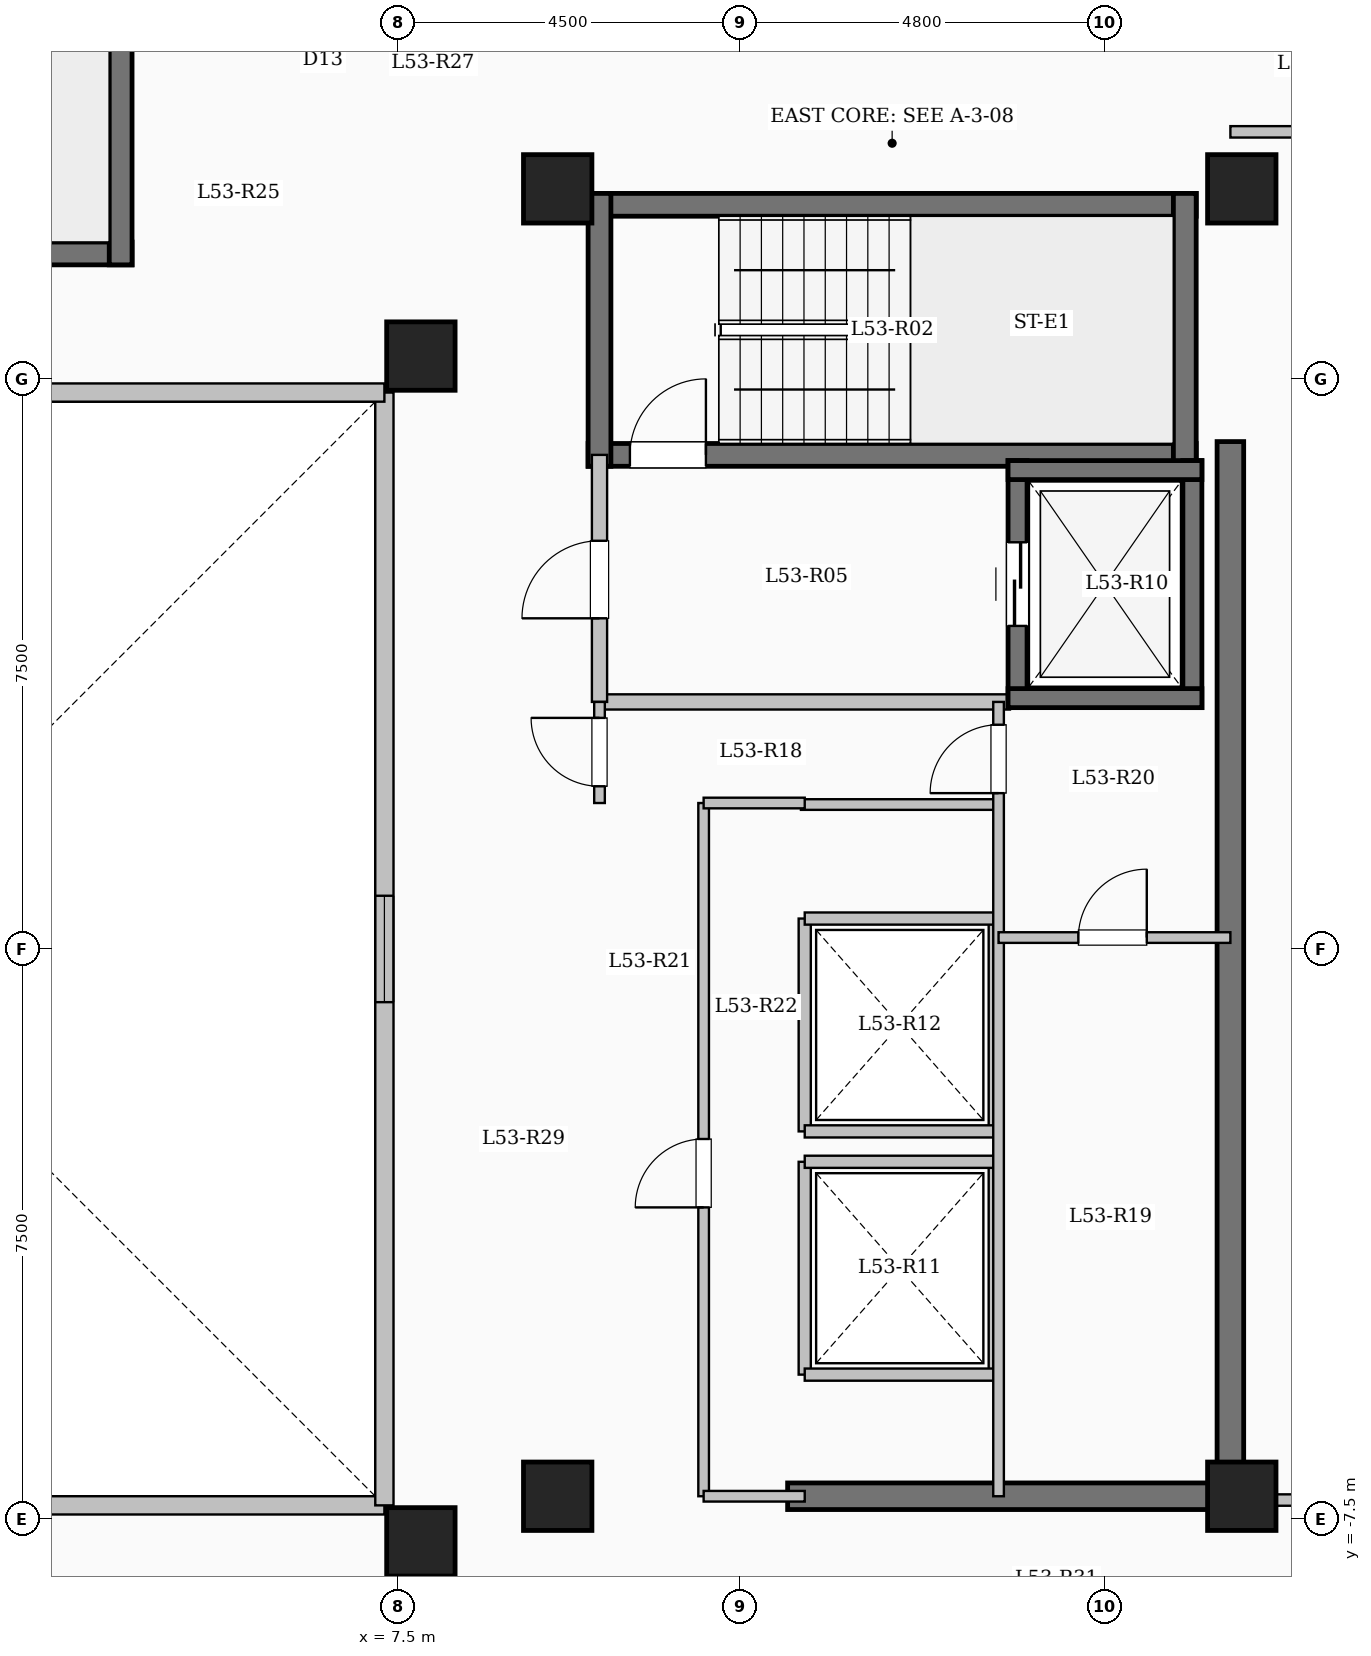
"""IFC4 building model, lengths in metres.
Left out: names, types, materials, properties, quantities, classifications, styles, units other than length and angle.
Written with IfcOpenShell. Run it as: python <this file> out.ifc"""

import sys

from ifc_helpers import new_model, si_unit, direction, frame, frame_2d, origin, origin_2d, place, context, subcontext, project, spatial, rectangle, extrude, element, fill, save


model = new_model("IFC4")
c1 = context("Model", 3, precision=1e-05, world=origin(), true_north=direction((0.0, 1.0)))
c2 = subcontext(c1, "Body", "Model", "MODEL_VIEW")
j1 = project(units=[si_unit("LENGTHUNIT", "METRE"), si_unit("PLANEANGLEUNIT", "RADIAN")], contexts=[c1])
p1 = place(None, origin())
s1 = spatial("IfcSite", under=j1, at=p1, CompositionType="ELEMENT")
p2 = place(p1, origin())
s2 = spatial("IfcBuilding", under=s1, at=p2, CompositionType="ELEMENT")
p3 = place(p2, frame((0.0, 0.0, 196.95)))
s3 = spatial("IfcBuildingStorey", under=s2, at=p3, CompositionType="ELEMENT", Elevation=196.95)
for number, where, z_axis, x_axis in (
    (1, (7.8, -7.8, 0.0), (0.0, 0.0, 1.0), (1.0, 0.0, 0.0)),
    (2, (7.8, 7.8, 0.0), (0.0, 0.0, 1.0), (1.0, 0.0, 0.0)),
    (3, (9.6, -7.2, 0.0), (0.0, 0.0, 1.0), (1.0, 0.0, 0.0)),
    (4, (9.6, 10.0, 0.0), (0.0, 0.0, 1.0), (1.0, 0.0, 0.0)),
    (5, (18.6, -7.2, 0.0), (0.0, 0.0, 1.0), (1.0, 0.0, 0.0)),
    (6, (18.6, 10.0, 0.0), (0.0, 0.0, 1.0), (1.0, 0.0, 0.0)),
):
    element("IfcColumn", number, at=place(p3, frame(where, z_axis=z_axis, x_axis=x_axis)), inside=s3, PredefinedType="COLUMN", context=c2, shape_type="SweptSolid", body=[
        extrude(rectangle(XDim=0.9, YDim=0.9, at=origin_2d()), origin(), (0.0, 0.0, 1.0), 3.35),
    ])
p4 = place(p3, frame((-7.32, -7.32, 0.0), z_axis=(0.0, 0.0, 1.0), x_axis=(1.0, 0.0, 0.0)))
e7 = element("IfcWall", 7, at=p4, inside=s3, PredefinedType="SOLIDWALL", context=c2, shape_type="SweptSolid", body=[
    extrude(rectangle(XDim=14.64, YDim=0.24, at=frame_2d((7.32, 0.0))), origin(), (0.0, 0.0, 1.0), 3.1),
])
p5 = place(p4, frame((6.62, 0.0, 0.95)))
e8 = element("IfcOpeningElement", 8, at=p5, cuts=e7, PredefinedType="OPENING", context=c2, shape_type="SweptSolid", body=[
    extrude(rectangle(XDim=1.4, YDim=1.5, at=frame_2d((0.7, 0.75))), frame((0.0, 0.13, 0.0), z_axis=(0.0, -1.0, 0.0), x_axis=(1.0, 0.0, 0.0)), (0.0, 0.0, 1.0), 0.26),
])
p6 = place(p3, frame((7.32, -7.32, 0.0), z_axis=(0.0, 0.0, 1.0), x_axis=(0.0, 1.0, 0.0)))
e9 = element("IfcWall", 9, at=p6, inside=s3, PredefinedType="SOLIDWALL", context=c2, shape_type="SweptSolid", body=[
    extrude(rectangle(XDim=14.64, YDim=0.24, at=frame_2d((7.32, 0.0))), origin(), (0.0, 0.0, 1.0), 3.1),
])
p7 = place(p6, frame((6.62, 0.0, 0.95)))
e10 = element("IfcOpeningElement", 10, at=p7, cuts=e9, PredefinedType="OPENING", context=c2, shape_type="SweptSolid", body=[
    extrude(rectangle(XDim=1.4, YDim=1.5, at=frame_2d((0.7, 0.75))), frame((0.0, 0.13, 0.0), z_axis=(0.0, -1.0, 0.0), x_axis=(1.0, 0.0, 0.0)), (0.0, 0.0, 1.0), 0.26),
])
p8 = place(p3, frame((7.32, 7.32, 0.0), z_axis=(0.0, 0.0, 1.0), x_axis=(-1.0, 0.0, 0.0)))
e11 = element("IfcWall", 11, at=p8, inside=s3, PredefinedType="SOLIDWALL", context=c2, shape_type="SweptSolid", body=[
    extrude(rectangle(XDim=14.64, YDim=0.24, at=frame_2d((7.32, 0.0))), origin(), (0.0, 0.0, 1.0), 3.1),
])
p9 = place(p8, frame((6.62, 0.0, 0.95)))
e12 = element("IfcOpeningElement", 12, at=p9, cuts=e11, PredefinedType="OPENING", context=c2, shape_type="SweptSolid", body=[
    extrude(rectangle(XDim=1.4, YDim=1.5, at=frame_2d((0.7, 0.75))), frame((0.0, 0.13, 0.0), z_axis=(0.0, -1.0, 0.0), x_axis=(1.0, 0.0, 0.0)), (0.0, 0.0, 1.0), 0.26),
])
p10 = place(p3, frame((10.0, 9.79, 0.0), z_axis=(0.0, 0.0, 1.0), x_axis=(1.0, 0.0, 0.0)))
e13 = element("IfcWall", 13, at=p10, inside=s3, PredefinedType="SHEAR", context=c2, shape_type="SweptSolid", body=[
    extrude(rectangle(XDim=8.0, YDim=0.3, at=frame_2d((4.0, 0.0))), origin(), (0.0, 0.0, 1.0), 3.35),
])
p11 = place(p3, frame((10.0, 6.5, 0.0), z_axis=(0.0, 0.0, 1.0), x_axis=(1.0, 0.0, 0.0)))
e14 = element("IfcWall", 14, at=p11, inside=s3, PredefinedType="SHEAR", context=c2, shape_type="SweptSolid", body=[
    extrude(rectangle(XDim=8.0, YDim=0.3, at=frame_2d((4.0, 0.0))), origin(), (0.0, 0.0, 1.0), 3.35),
])
p12 = place(p11, frame((0.55, 0.0, 0.0)))
e15 = element("IfcOpeningElement", 15, at=p12, cuts=e14, PredefinedType="OPENING", context=c2, shape_type="SweptSolid", body=[
    extrude(rectangle(XDim=1.0, YDim=2.15, at=frame_2d((0.5, 1.075))), frame((0.0, 0.16, 0.0), z_axis=(0.0, -1.0, 0.0), x_axis=(1.0, 0.0, 0.0)), (0.0, 0.0, 1.0), 0.32),
])
for number, where, z_axis, x_axis in (
    (16, (10.15, 6.35, 0.0), (0.0, 0.0, 1.0), (0.0, 1.0, 0.0)),
    (17, (17.85, 6.35, 0.0), (0.0, 0.0, 1.0), (0.0, 1.0, 0.0)),
):
    element("IfcWall", number, at=place(p3, frame(where, z_axis=z_axis, x_axis=x_axis)), inside=s3, PredefinedType="SHEAR", context=c2, shape_type="SweptSolid", body=[
        extrude(rectangle(XDim=3.59, YDim=0.3, at=frame_2d((1.795, 0.0))), origin(), (0.0, 0.0, 1.0), 3.35),
    ])
p13 = place(p3, frame((-4.0, 9.15, 0.0), z_axis=(0.0, 0.0, 1.0), x_axis=(1.0, 0.0, 0.0)))
e18 = element("IfcWall", 18, at=p13, inside=s3, PredefinedType="SHEAR", context=c2, shape_type="SweptSolid", body=[
    extrude(rectangle(XDim=8.0, YDim=0.3, at=frame_2d((4.0, 0.0))), origin(), (0.0, 0.0, 1.0), 3.35),
])
p14 = place(p13, frame((0.55, 0.0, 0.0)))
e19 = element("IfcOpeningElement", 19, at=p14, cuts=e18, PredefinedType="OPENING", context=c2, shape_type="SweptSolid", body=[
    extrude(rectangle(XDim=1.0, YDim=2.15, at=frame_2d((0.5, 1.075))), frame((0.0, 0.16, 0.0), z_axis=(0.0, -1.0, 0.0), x_axis=(1.0, 0.0, 0.0)), (0.0, 0.0, 1.0), 0.32),
])
p15 = place(p3, frame((3.85, 9.0, 0.0), z_axis=(0.0, 0.0, 1.0), x_axis=(0.0, 1.0, 0.0)))
e20 = element("IfcWall", 20, at=p15, inside=s3, PredefinedType="SHEAR", context=c2, shape_type="SweptSolid", body=[
    extrude(rectangle(XDim=3.59, YDim=0.3, at=frame_2d((1.795, 0.0))), origin(), (0.0, 0.0, 1.0), 3.35),
])
p16 = place(p3, frame((10.15, 3.25, 0.0), z_axis=(0.0, 0.0, 1.0), x_axis=(1.0, 0.0, 0.0)))
e21 = element("IfcWall", 21, at=p16, inside=s3, PredefinedType="SOLIDWALL", context=c2, shape_type="SweptSolid", body=[
    extrude(rectangle(XDim=5.4, YDim=0.2, at=frame_2d((2.7, 0.0))), origin(), (0.0, 0.0, 1.0), 3.1),
])
p17 = place(p3, frame((10.15, 3.25, 0.0), z_axis=(0.0, 0.0, 1.0), x_axis=(0.0, 1.0, 0.0)))
e22 = element("IfcWall", 22, at=p17, inside=s3, PredefinedType="SOLIDWALL", context=c2, shape_type="SweptSolid", body=[
    extrude(rectangle(XDim=3.25, YDim=0.2, at=frame_2d((1.625, 0.0))), origin(), (0.0, 0.0, 1.0), 3.1),
])
p18 = place(p17, frame((1.1, 0.0, 0.0)))
e23 = element("IfcOpeningElement", 23, at=p18, cuts=e22, PredefinedType="OPENING", context=c2, shape_type="SweptSolid", body=[
    extrude(rectangle(XDim=1.02, YDim=2.15, at=frame_2d((0.51, 1.075))), frame((0.0, 0.11, 0.0), z_axis=(0.0, -1.0, 0.0), x_axis=(1.0, 0.0, 0.0)), (0.0, 0.0, 1.0), 0.22),
])
p19 = place(p3, frame((15.65, 3.175, 0.0), z_axis=(0.0, 0.0, 1.0), x_axis=(0.0, 1.0, 0.0)))
e24 = element("IfcWall", 24, at=p19, inside=s3, PredefinedType="SHEAR", context=c2, shape_type="SweptSolid", body=[
    extrude(rectangle(XDim=3.25, YDim=0.25, at=frame_2d((1.625, 0.0))), origin(), (0.0, 0.0, 1.0), 3.35),
])
p20 = place(p19, frame((1.075, 0.0, 0.0)))
e25 = element("IfcOpeningElement", 25, at=p20, cuts=e24, PredefinedType="OPENING", context=c2, shape_type="SweptSolid", body=[
    extrude(rectangle(XDim=1.1, YDim=2.15, at=frame_2d((0.55, 1.075))), frame((0.0, 0.135, 0.0), z_axis=(0.0, -1.0, 0.0), x_axis=(1.0, 0.0, 0.0)), (0.0, 0.0, 1.0), 0.27),
])
p21 = place(p3, frame((17.95, 3.175, 0.0), z_axis=(0.0, 0.0, 1.0), x_axis=(0.0, 1.0, 0.0)))
e26 = element("IfcWall", 26, at=p21, inside=s3, PredefinedType="SHEAR", context=c2, shape_type="SweptSolid", body=[
    extrude(rectangle(XDim=3.25, YDim=0.25, at=frame_2d((1.625, 0.0))), origin(), (0.0, 0.0, 1.0), 3.35),
])
for number, where, z_axis, x_axis in (
    (27, (15.525, 3.3, 0.0), (0.0, 0.0, 1.0), (1.0, 0.0, 0.0)),
    (28, (15.525, 6.3, 0.0), (0.0, 0.0, 1.0), (1.0, 0.0, 0.0)),
):
    element("IfcWall", number, at=place(p3, frame(where, z_axis=z_axis, x_axis=x_axis)), inside=s3, PredefinedType="SHEAR", context=c2, shape_type="SweptSolid", body=[
        extrude(rectangle(XDim=2.55, YDim=0.25, at=frame_2d((1.275, 0.0))), origin(), (0.0, 0.0, 1.0), 3.35),
    ])
for number, where, z_axis, x_axis in (
    (29, (12.85, -5.6, 0.0), (0.0, 0.0, 1.0), (0.0, 1.0, 0.0)),
    (30, (15.35, -5.6, 0.0), (0.0, 0.0, 1.0), (0.0, 1.0, 0.0)),
):
    element("IfcWall", number, at=place(p3, frame(where, z_axis=z_axis, x_axis=x_axis)), inside=s3, PredefinedType="SOLIDWALL", context=c2, shape_type="SweptSolid", body=[
        extrude(rectangle(XDim=2.8, YDim=0.16, at=frame_2d((1.4, 0.0))), origin(), (0.0, 0.0, 1.0), 3.1),
    ])
for number, where, z_axis, x_axis in (
    (31, (12.85, -5.6, 0.0), (0.0, 0.0, 1.0), (1.0, 0.0, 0.0)),
    (32, (12.85, -2.8, 0.0), (0.0, 0.0, 1.0), (1.0, 0.0, 0.0)),
):
    element("IfcWall", number, at=place(p3, frame(where, z_axis=z_axis, x_axis=x_axis)), inside=s3, PredefinedType="SOLIDWALL", context=c2, shape_type="SweptSolid", body=[
        extrude(rectangle(XDim=2.5, YDim=0.16, at=frame_2d((1.25, 0.0))), origin(), (0.0, 0.0, 1.0), 3.1),
    ])
for number, where, z_axis, x_axis in (
    (33, (12.85, -2.4, 0.0), (0.0, 0.0, 1.0), (0.0, 1.0, 0.0)),
    (34, (15.35, -2.4, 0.0), (0.0, 0.0, 1.0), (0.0, 1.0, 0.0)),
):
    element("IfcWall", number, at=place(p3, frame(where, z_axis=z_axis, x_axis=x_axis)), inside=s3, PredefinedType="SOLIDWALL", context=c2, shape_type="SweptSolid", body=[
        extrude(rectangle(XDim=2.8, YDim=0.16, at=frame_2d((1.4, 0.0))), origin(), (0.0, 0.0, 1.0), 3.1),
    ])
for number, where, z_axis, x_axis in (
    (35, (12.85, -2.4, 0.0), (0.0, 0.0, 1.0), (1.0, 0.0, 0.0)),
    (36, (12.85, 0.4, 0.0), (0.0, 0.0, 1.0), (1.0, 0.0, 0.0)),
):
    element("IfcWall", number, at=place(p3, frame(where, z_axis=z_axis, x_axis=x_axis)), inside=s3, PredefinedType="SOLIDWALL", context=c2, shape_type="SweptSolid", body=[
        extrude(rectangle(XDim=2.5, YDim=0.16, at=frame_2d((1.25, 0.0))), origin(), (0.0, 0.0, 1.0), 3.1),
    ])
p22 = place(p3, frame((18.45, -7.375, 0.0), z_axis=(0.0, 0.0, 1.0), x_axis=(0.0, 1.0, 0.0)))
e37 = element("IfcWall", 37, at=p22, inside=s3, PredefinedType="SHEAR", context=c2, shape_type="SweptSolid", body=[
    extrude(rectangle(XDim=14.05, YDim=0.35, at=frame_2d((7.025, 0.0))), origin(), (0.0, 0.0, 1.0), 3.35),
])
p23 = place(p3, frame((12.625, -7.2, 0.0), z_axis=(0.0, 0.0, 1.0), x_axis=(1.0, 0.0, 0.0)))
e38 = element("IfcWall", 38, at=p23, inside=s3, PredefinedType="SHEAR", context=c2, shape_type="SweptSolid", body=[
    extrude(rectangle(XDim=6.0, YDim=0.35, at=frame_2d((3.0, 0.0))), origin(), (0.0, 0.0, 1.0), 3.35),
])
p24 = place(p3, frame((12.8, 1.9, 0.0), z_axis=(0.0, 0.0, 1.0), x_axis=(1.0, 0.0, 0.0)))
e39 = element("IfcWall", 39, at=p24, inside=s3, PredefinedType="PARTITIONING", context=c2, shape_type="SweptSolid", body=[
    extrude(rectangle(XDim=2.6, YDim=0.14, at=frame_2d((1.3, 0.0))), origin(), (0.0, 0.0, 1.0), 3.1),
])
p25 = place(p3, frame((10.15, 1.92, 0.0), z_axis=(0.0, 0.0, 1.0), x_axis=(0.0, 1.0, 0.0)))
e40 = element("IfcWall", 40, at=p25, inside=s3, PredefinedType="PARTITIONING", context=c2, shape_type="SweptSolid", body=[
    extrude(rectangle(XDim=1.33, YDim=0.14, at=frame_2d((0.665, 0.0))), origin(), (0.0, 0.0, 1.0), 3.1),
])
p26 = place(p25, frame((0.22, 0.0, 0.0)))
e41 = element("IfcOpeningElement", 41, at=p26, cuts=e40, PredefinedType="OPENING", context=c2, shape_type="SweptSolid", body=[
    extrude(rectangle(XDim=0.9, YDim=2.08, at=frame_2d((0.45, 1.04))), frame((0.0, 0.08, 0.0), z_axis=(0.0, -1.0, 0.0), x_axis=(1.0, 0.0, 0.0)), (0.0, 0.0, 1.0), 0.16),
])
p27 = place(p3, frame((15.4, -7.2, 0.0), z_axis=(0.0, 0.0, 1.0), x_axis=(0.0, 1.0, 0.0)))
e42 = element("IfcWall", 42, at=p27, inside=s3, PredefinedType="PARTITIONING", context=c2, shape_type="SweptSolid", body=[
    extrude(rectangle(XDim=10.45, YDim=0.14, at=frame_2d((5.225, 0.0))), origin(), (0.0, 0.0, 1.0), 3.1),
])
p28 = place(p27, frame((9.25, 0.0, 0.0)))
e43 = element("IfcOpeningElement", 43, at=p28, cuts=e42, PredefinedType="OPENING", context=c2, shape_type="SweptSolid", body=[
    extrude(rectangle(XDim=0.9, YDim=2.08, at=frame_2d((0.45, 1.04))), frame((0.0, 0.08, 0.0), z_axis=(0.0, -1.0, 0.0), x_axis=(1.0, 0.0, 0.0)), (0.0, 0.0, 1.0), 0.16),
])
p29 = place(p3, frame((15.4, 0.15, 0.0), z_axis=(0.0, 0.0, 1.0), x_axis=(1.0, 0.0, 0.0)))
e44 = element("IfcWall", 44, at=p29, inside=s3, PredefinedType="PARTITIONING", context=c2, shape_type="SweptSolid", body=[
    extrude(rectangle(XDim=3.05, YDim=0.14, at=frame_2d((1.525, 0.0))), origin(), (0.0, 0.0, 1.0), 3.1),
])
p30 = place(p29, frame((1.05, 0.0, 0.0)))
e45 = element("IfcOpeningElement", 45, at=p30, cuts=e44, PredefinedType="OPENING", context=c2, shape_type="SweptSolid", body=[
    extrude(rectangle(XDim=0.9, YDim=2.08, at=frame_2d((0.45, 1.04))), frame((0.0, 0.08, 0.0), z_axis=(0.0, -1.0, 0.0), x_axis=(1.0, 0.0, 0.0)), (0.0, 0.0, 1.0), 0.16),
])
p31 = place(p3, frame((11.52, -7.2, 0.0), z_axis=(0.0, 0.0, 1.0), x_axis=(0.0, 1.0, 0.0)))
e46 = element("IfcWall", 46, at=p31, inside=s3, PredefinedType="PARTITIONING", context=c2, shape_type="SweptSolid", body=[
    extrude(rectangle(XDim=9.12, YDim=0.14, at=frame_2d((4.56, 0.0))), origin(), (0.0, 0.0, 1.0), 3.1),
])
p32 = place(p31, frame((3.8, 0.0, 0.0)))
e47 = element("IfcOpeningElement", 47, at=p32, cuts=e46, PredefinedType="OPENING", context=c2, shape_type="SweptSolid", body=[
    extrude(rectangle(XDim=0.9, YDim=2.08, at=frame_2d((0.45, 1.04))), frame((0.0, 0.08, 0.0), z_axis=(0.0, -1.0, 0.0), x_axis=(1.0, 0.0, 0.0)), (0.0, 0.0, 1.0), 0.16),
])
p33 = place(p3, frame((11.52, 1.92, 0.0), z_axis=(0.0, 0.0, 1.0), x_axis=(1.0, 0.0, 0.0)))
e48 = element("IfcWall", 48, at=p33, inside=s3, PredefinedType="PARTITIONING", context=c2, shape_type="SweptSolid", body=[
    extrude(rectangle(XDim=1.33, YDim=0.14, at=frame_2d((0.665, 0.0))), origin(), (0.0, 0.0, 1.0), 3.1),
])
p34 = place(p3, frame((11.52, -7.2, 0.0), z_axis=(0.0, 0.0, 1.0), x_axis=(1.0, 0.0, 0.0)))
e49 = element("IfcWall", 49, at=p34, inside=s3, PredefinedType="PARTITIONING", context=c2, shape_type="SweptSolid", body=[
    extrude(rectangle(XDim=1.33, YDim=0.14, at=frame_2d((0.665, 0.0))), origin(), (0.0, 0.0, 1.0), 2.235),
])
p35 = place(p3, frame((18.45, -7.25, 0.0), z_axis=(0.0, 0.0, 1.0), x_axis=(1.0, 0.0, 0.0)))
e50 = element("IfcWall", 50, at=p35, inside=s3, PredefinedType="PARTITIONING", context=c2, shape_type="SweptSolid", body=[
    extrude(rectangle(XDim=5.13, YDim=0.15, at=frame_2d((2.565, 0.0))), origin(), (0.0, 0.0, 1.0), 3.1),
])
p36 = place(p35, frame((1.95, 0.0, 0.0)))
e51 = element("IfcOpeningElement", 51, at=p36, cuts=e50, PredefinedType="OPENING", context=c2, shape_type="SweptSolid", body=[
    extrude(rectangle(XDim=1.08, YDim=2.15, at=frame_2d((0.54, 1.075))), frame((0.0, 0.085, 0.0), z_axis=(0.0, -1.0, 0.0), x_axis=(1.0, 0.0, 0.0)), (0.0, 0.0, 1.0), 0.17),
])
p37 = place(p3, frame((18.45, 10.75, 0.0), z_axis=(0.0, 0.0, 1.0), x_axis=(1.0, 0.0, 0.0)))
e52 = element("IfcWall", 52, at=p37, inside=s3, PredefinedType="PARTITIONING", context=c2, shape_type="SweptSolid", body=[
    extrude(rectangle(XDim=5.13, YDim=0.15, at=frame_2d((2.565, 0.0))), origin(), (0.0, 0.0, 1.0), 3.1),
])
p38 = place(p7, origin())
e53 = element("IfcWindow", 53, at=p38, inside=s3, PartitioningType="SINGLE_PANEL", PredefinedType="WINDOW", context=c2, shape_type="SweptSolid", body=[
    extrude(rectangle(XDim=1.4, YDim=1.5, at=frame_2d((0.7, 0.75))), frame((0.0, 0.03, 0.0), z_axis=(0.0, -1.0, 0.0), x_axis=(1.0, 0.0, 0.0)), (0.0, 0.0, 1.0), 0.06),
])
fill(e10, e53)
p39 = place(p12, origin())
e54 = element("IfcDoor", 54, at=p39, inside=s3, OperationType="SINGLE_SWING_RIGHT", PredefinedType="DOOR", context=c2, shape_type="SweptSolid", body=[
    extrude(rectangle(XDim=1.0, YDim=2.15, at=frame_2d((0.5, 1.075))), frame((0.0, 0.025, 0.0), z_axis=(0.0, -1.0, 0.0), x_axis=(1.0, 0.0, 0.0)), (0.0, 0.0, 1.0), 0.05),
])
fill(e15, e54)
p40 = place(p18, origin())
e55 = element("IfcDoor", 55, at=p40, inside=s3, OperationType="SINGLE_SWING_LEFT", PredefinedType="DOOR", context=c2, shape_type="SweptSolid", body=[
    extrude(rectangle(XDim=1.02, YDim=2.15, at=frame_2d((0.51, 1.075))), frame((0.0, 0.025, 0.0), z_axis=(0.0, -1.0, 0.0), x_axis=(1.0, 0.0, 0.0)), (0.0, 0.0, 1.0), 0.05),
])
fill(e23, e55)
p41 = place(p20, origin())
e56 = element("IfcDoor", 56, at=p41, inside=s3, OperationType="SLIDING_TO_LEFT", PredefinedType="DOOR", context=c2, shape_type="SweptSolid", body=[
    extrude(rectangle(XDim=1.1, YDim=2.15, at=frame_2d((0.55, 1.075))), frame((0.0, 0.025, 0.0), z_axis=(0.0, -1.0, 0.0), x_axis=(1.0, 0.0, 0.0)), (0.0, 0.0, 1.0), 0.05),
])
fill(e25, e56)
p42 = place(p26, origin())
e57 = element("IfcDoor", 57, at=p42, inside=s3, OperationType="SINGLE_SWING_RIGHT", PredefinedType="DOOR", context=c2, shape_type="SweptSolid", body=[
    extrude(rectangle(XDim=0.9, YDim=2.08, at=frame_2d((0.45, 1.04))), frame((0.0, 0.025, 0.0), z_axis=(0.0, -1.0, 0.0), x_axis=(1.0, 0.0, 0.0)), (0.0, 0.0, 1.0), 0.05),
])
fill(e41, e57)
p43 = place(p28, origin())
e58 = element("IfcDoor", 58, at=p43, inside=s3, OperationType="SINGLE_SWING_LEFT", PredefinedType="DOOR", context=c2, shape_type="SweptSolid", body=[
    extrude(rectangle(XDim=0.9, YDim=2.08, at=frame_2d((0.45, 1.04))), frame((0.0, 0.025, 0.0), z_axis=(0.0, -1.0, 0.0), x_axis=(1.0, 0.0, 0.0)), (0.0, 0.0, 1.0), 0.05),
])
fill(e43, e58)
p44 = place(p30, origin())
e59 = element("IfcDoor", 59, at=p44, inside=s3, OperationType="SINGLE_SWING_RIGHT", PredefinedType="DOOR", context=c2, shape_type="SweptSolid", body=[
    extrude(rectangle(XDim=0.9, YDim=2.08, at=frame_2d((0.45, 1.04))), frame((0.0, 0.025, 0.0), z_axis=(0.0, -1.0, 0.0), x_axis=(1.0, 0.0, 0.0)), (0.0, 0.0, 1.0), 0.05),
])
fill(e45, e59)
p45 = place(p32, origin())
e60 = element("IfcDoor", 60, at=p45, inside=s3, OperationType="SINGLE_SWING_LEFT", PredefinedType="DOOR", context=c2, shape_type="SweptSolid", body=[
    extrude(rectangle(XDim=0.9, YDim=2.08, at=frame_2d((0.45, 1.04))), frame((0.0, 0.025, 0.0), z_axis=(0.0, -1.0, 0.0), x_axis=(1.0, 0.0, 0.0)), (0.0, 0.0, 1.0), 0.05),
])
fill(e47, e60)
save(model, sys.argv[1])
